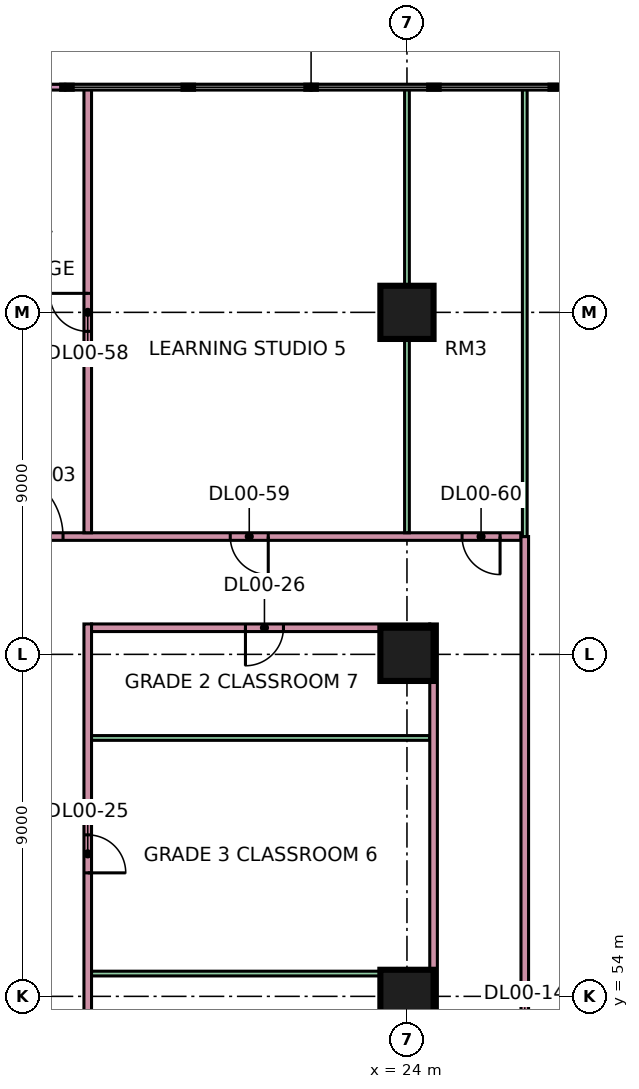
"""IFC4 building model, lengths in metres.
Left out: names, types, materials, properties, quantities, classifications, styles, units other than length and angle.
Written with IfcOpenShell. Run it as: python <this file> out.ifc"""

import sys

from ifc_helpers import new_model, si_unit, direction, frame, frame_2d, origin, origin_2d, place, context, subcontext, project, spatial, rectangle, extrude, element, fill, save


model = new_model("IFC4")
c1 = context("Model", 3, precision=1e-05, world=origin(), true_north=direction((0.0, 1.0)))
c2 = subcontext(c1, "Body", "Model", "MODEL_VIEW")
j1 = project(units=[si_unit("LENGTHUNIT", "METRE"), si_unit("PLANEANGLEUNIT", "RADIAN")], contexts=[c1])
p1 = place(None, origin())
s1 = spatial("IfcSite", under=j1, at=p1, CompositionType="ELEMENT")
p2 = place(p1, origin())
s2 = spatial("IfcBuilding", under=s1, at=p2, CompositionType="ELEMENT")
p3 = place(p2, origin())
s3 = spatial("IfcBuildingStorey", under=s2, at=p3, CompositionType="ELEMENT", Elevation=0.0)
for number, where, z_axis, x_axis in (
    (1, (24.0, 54.0, 0.0), (0.0, 0.0, 1.0), (1.0, 0.0, 0.0)),
    (2, (24.0, 63.0, 0.0), (0.0, 0.0, 1.0), (1.0, 0.0, 0.0)),
    (3, (24.0, 72.0, 0.0), (0.0, 0.0, 1.0), (1.0, 0.0, 0.0)),
):
    element("IfcColumn", number, at=place(p3, frame(where, z_axis=z_axis, x_axis=x_axis)), inside=s3, PredefinedType="COLUMN", context=c2, shape_type="SweptSolid", body=[
        extrude(rectangle(XDim=1.4, YDim=1.4, at=origin_2d()), origin(), (0.0, 0.0, 1.0), 7.2),
    ])
p4 = place(p3, frame((15.0, 77.925, 0.0), z_axis=(0.0, 0.0, 1.0), x_axis=(-1.0, 0.0, 0.0)))
e4 = element("IfcWall", 4, at=p4, inside=s3, PredefinedType="SOLIDWALL", context=c2, shape_type="SweptSolid", body=[
    extrude(rectangle(XDim=6.0, YDim=0.15, at=frame_2d((3.0, 0.0))), origin(), (0.0, 0.0, 1.0), 6.8),
])
p5 = place(p4, frame((1.2, 0.0, 0.0)))
e5 = element("IfcOpeningElement", 5, at=p5, cuts=e4, PredefinedType="OPENING", context=c2, shape_type="SweptSolid", body=[
    extrude(rectangle(XDim=3.6, YDim=2.8, at=frame_2d((1.8, 1.4))), frame((0.0, 0.085, 0.0), z_axis=(0.0, -1.0, 0.0), x_axis=(1.0, 0.0, 0.0)), (0.0, 0.0, 1.0), 0.17),
])
p6 = place(p3, frame((-3.0, 66.1, 0.0), z_axis=(0.0, 0.0, 1.0), x_axis=(1.0, 0.0, 0.0)))
e6 = element("IfcWall", 6, at=p6, inside=s3, PredefinedType="PARTITIONING", context=c2, shape_type="SweptSolid", body=[
    extrude(rectangle(XDim=30.0, YDim=0.2, at=frame_2d((15.0, 0.0))), origin(), (0.0, 0.0, 1.0), 6.8),
])
p7 = place(p6, frame((0.65, 0.0, 0.0)))
e7 = element("IfcOpeningElement", 7, at=p7, cuts=e6, PredefinedType="OPENING", context=c2, shape_type="SweptSolid", body=[
    extrude(rectangle(XDim=1.0, YDim=2.1, at=frame_2d((0.5, 1.05))), frame((0.0, 0.11, 0.0), z_axis=(0.0, -1.0, 0.0), x_axis=(1.0, 0.0, 0.0)), (0.0, 0.0, 1.0), 0.22),
])
p8 = place(p6, frame((8.6, 0.0, 0.0)))
e8 = element("IfcOpeningElement", 8, at=p8, cuts=e6, PredefinedType="OPENING", context=c2, shape_type="SweptSolid", body=[
    extrude(rectangle(XDim=1.0, YDim=2.1, at=frame_2d((0.5, 1.05))), frame((0.0, 0.11, 0.0), z_axis=(0.0, -1.0, 0.0), x_axis=(1.0, 0.0, 0.0)), (0.0, 0.0, 1.0), 0.22),
])
p9 = place(p6, frame((22.35, 0.0, 0.0)))
e9 = element("IfcOpeningElement", 9, at=p9, cuts=e6, PredefinedType="OPENING", context=c2, shape_type="SweptSolid", body=[
    extrude(rectangle(XDim=1.0, YDim=2.1, at=frame_2d((0.5, 1.05))), frame((0.0, 0.11, 0.0), z_axis=(0.0, -1.0, 0.0), x_axis=(1.0, 0.0, 0.0)), (0.0, 0.0, 1.0), 0.22),
])
p10 = place(p6, frame((28.45, 0.0, 0.0)))
e10 = element("IfcOpeningElement", 10, at=p10, cuts=e6, PredefinedType="OPENING", context=c2, shape_type="SweptSolid", body=[
    extrude(rectangle(XDim=1.0, YDim=2.1, at=frame_2d((0.5, 1.05))), frame((0.0, 0.11, 0.0), z_axis=(0.0, -1.0, 0.0), x_axis=(1.0, 0.0, 0.0)), (0.0, 0.0, 1.0), 0.22),
])
p11 = place(p6, frame((16.15, 0.0, 0.0)))
e11 = element("IfcOpeningElement", 11, at=p11, cuts=e6, PredefinedType="OPENING", context=c2, shape_type="SweptSolid", body=[
    extrude(rectangle(XDim=1.8, YDim=2.1, at=frame_2d((0.9, 1.05))), frame((0.0, 0.11, 0.0), z_axis=(0.0, -1.0, 0.0), x_axis=(1.0, 0.0, 0.0)), (0.0, 0.0, 1.0), 0.22),
])
p12 = place(p3, frame((15.6, 51.225, 0.0), z_axis=(0.0, 0.0, 1.0), x_axis=(0.0, 1.0, 0.0)))
e12 = element("IfcWall", 12, at=p12, inside=s3, PredefinedType="PARTITIONING", context=c2, shape_type="SweptSolid", body=[
    extrude(rectangle(XDim=12.575, YDim=0.2, at=frame_2d((6.288, 0.0))), origin(), (0.0, 0.0, 1.0), 6.8),
])
p13 = place(p12, frame((6.025, 0.0, 0.0)))
e13 = element("IfcOpeningElement", 13, at=p13, cuts=e12, PredefinedType="OPENING", context=c2, shape_type="SweptSolid", body=[
    extrude(rectangle(XDim=1.0, YDim=2.1, at=frame_2d((0.5, 1.05))), frame((0.0, 0.11, 0.0), z_axis=(0.0, -1.0, 0.0), x_axis=(1.0, 0.0, 0.0)), (0.0, 0.0, 1.0), 0.22),
])
p14 = place(p3, frame((15.6, 66.2, 0.0), z_axis=(0.0, 0.0, 1.0), x_axis=(0.0, 1.0, 0.0)))
e14 = element("IfcWall", 14, at=p14, inside=s3, PredefinedType="PARTITIONING", context=c2, shape_type="SweptSolid", body=[
    extrude(rectangle(XDim=11.725, YDim=0.2, at=frame_2d((5.863, 0.0))), origin(), (0.0, 0.0, 1.0), 6.8),
])
p15 = place(p14, frame((5.3, 0.0, 0.0)))
e15 = element("IfcOpeningElement", 15, at=p15, cuts=e14, PredefinedType="OPENING", context=c2, shape_type="SweptSolid", body=[
    extrude(rectangle(XDim=1.0, YDim=2.1, at=frame_2d((0.5, 1.05))), frame((0.0, 0.11, 0.0), z_axis=(0.0, -1.0, 0.0), x_axis=(1.0, 0.0, 0.0)), (0.0, 0.0, 1.0), 0.22),
])
for number, where, z_axis, x_axis in (
    (16, (15.7, 54.6, 0.0), (0.0, 0.0, 1.0), (1.0, 0.0, 0.0)),
    (17, (15.7, 60.8, 0.0), (0.0, 0.0, 1.0), (1.0, 0.0, 0.0)),
):
    element("IfcWall", number, at=place(p3, frame(where, z_axis=z_axis, x_axis=x_axis)), inside=s3, PredefinedType="PARTITIONING", context=c2, shape_type="SweptSolid", body=[
        extrude(rectangle(XDim=8.9, YDim=0.125, at=frame_2d((4.45, 0.0))), origin(), (0.0, 0.0, 1.0), 6.8),
    ])
p16 = place(p3, frame((15.7, 63.7, 0.0), z_axis=(0.0, 0.0, 1.0), x_axis=(1.0, 0.0, 0.0)))
e18 = element("IfcWall", 18, at=p16, inside=s3, PredefinedType="PARTITIONING", context=c2, shape_type="SweptSolid", body=[
    extrude(rectangle(XDim=8.9, YDim=0.2, at=frame_2d((4.45, 0.0))), origin(), (0.0, 0.0, 1.0), 6.8),
])
p17 = place(p16, frame((4.05, 0.0, 0.0)))
e19 = element("IfcOpeningElement", 19, at=p17, cuts=e18, PredefinedType="OPENING", context=c2, shape_type="SweptSolid", body=[
    extrude(rectangle(XDim=1.0, YDim=2.1, at=frame_2d((0.5, 1.05))), frame((0.0, 0.11, 0.0), z_axis=(0.0, -1.0, 0.0), x_axis=(1.0, 0.0, 0.0)), (0.0, 0.0, 1.0), 0.22),
])
p18 = place(p3, frame((24.0, 66.2, 0.0), z_axis=(0.0, 0.0, 1.0), x_axis=(0.0, 1.0, 0.0)))
e20 = element("IfcWall", 20, at=p18, inside=s3, PredefinedType="PARTITIONING", context=c2, shape_type="SweptSolid", body=[
    extrude(rectangle(XDim=11.725, YDim=0.125, at=frame_2d((5.863, 0.0))), origin(), (0.0, 0.0, 1.0), 6.8),
])
p19 = place(p3, frame((24.7, 44.3, 0.0), z_axis=(0.0, 0.0, 1.0), x_axis=(0.0, 1.0, 0.0)))
e21 = element("IfcWall", 21, at=p19, inside=s3, PredefinedType="PARTITIONING", context=c2, shape_type="SweptSolid", body=[
    extrude(rectangle(XDim=19.5, YDim=0.2, at=frame_2d((9.75, 0.0))), origin(), (0.0, 0.0, 1.0), 6.8),
])
p20 = place(p19, frame((1.45, 0.0, 0.0)))
e22 = element("IfcOpeningElement", 22, at=p20, cuts=e21, PredefinedType="OPENING", context=c2, shape_type="SweptSolid", body=[
    extrude(rectangle(XDim=1.0, YDim=2.1, at=frame_2d((0.5, 1.05))), frame((0.0, 0.11, 0.0), z_axis=(0.0, -1.0, 0.0), x_axis=(1.0, 0.0, 0.0)), (0.0, 0.0, 1.0), 0.22),
])
p21 = place(p19, frame((6.65, 0.0, 0.0)))
e23 = element("IfcOpeningElement", 23, at=p21, cuts=e21, PredefinedType="OPENING", context=c2, shape_type="SweptSolid", body=[
    extrude(rectangle(XDim=1.0, YDim=2.1, at=frame_2d((0.5, 1.05))), frame((0.0, 0.11, 0.0), z_axis=(0.0, -1.0, 0.0), x_axis=(1.0, 0.0, 0.0)), (0.0, 0.0, 1.0), 0.22),
])
p22 = place(p3, frame((27.1, 38.5, 0.0), z_axis=(0.0, 0.0, 1.0), x_axis=(0.0, 1.0, 0.0)))
e24 = element("IfcWall", 24, at=p22, inside=s3, PredefinedType="PARTITIONING", context=c2, shape_type="SweptSolid", body=[
    extrude(rectangle(XDim=27.6, YDim=0.2, at=frame_2d((13.8, 0.0))), origin(), (0.0, 0.0, 1.0), 6.8),
])
p23 = place(p22, frame((13.05, 0.0, 0.0)))
e25 = element("IfcOpeningElement", 25, at=p23, cuts=e24, PredefinedType="OPENING", context=c2, shape_type="SweptSolid", body=[
    extrude(rectangle(XDim=1.8, YDim=2.1, at=frame_2d((0.9, 1.05))), frame((0.0, 0.11, 0.0), z_axis=(0.0, -1.0, 0.0), x_axis=(1.0, 0.0, 0.0)), (0.0, 0.0, 1.0), 0.22),
])
p24 = place(p22, frame((3.05, 0.0, 0.0)))
e26 = element("IfcOpeningElement", 26, at=p24, cuts=e24, PredefinedType="OPENING", context=c2, shape_type="SweptSolid", body=[
    extrude(rectangle(XDim=1.8, YDim=2.1, at=frame_2d((0.9, 1.05))), frame((0.0, 0.11, 0.0), z_axis=(0.0, -1.0, 0.0), x_axis=(1.0, 0.0, 0.0)), (0.0, 0.0, 1.0), 0.22),
])
p25 = place(p3, frame((27.1, 66.1, 0.0), z_axis=(0.0, 0.0, 1.0), x_axis=(0.0, 1.0, 0.0)))
e27 = element("IfcWall", 27, at=p25, inside=s3, PredefinedType="PARTITIONING", context=c2, shape_type="SweptSolid", body=[
    extrude(rectangle(XDim=11.825, YDim=0.125, at=frame_2d((5.913, 0.0))), origin(), (0.0, 0.0, 1.0), 6.8),
])
p26 = place(p13, frame((1.0, 0.0, 0.0), z_axis=(0.0, 0.0, 1.0), x_axis=(-1.0, 0.0, 0.0)))
e28 = element("IfcDoor", 28, at=p26, inside=s3, OperationType="SINGLE_SWING_LEFT", PredefinedType="DOOR", context=c2, shape_type="SweptSolid", body=[
    extrude(rectangle(XDim=1.0, YDim=2.1, at=frame_2d((0.5, 1.05))), frame((0.0, 0.025, 0.0), z_axis=(0.0, -1.0, 0.0), x_axis=(1.0, 0.0, 0.0)), (0.0, 0.0, 1.0), 0.05),
])
fill(e13, e28)
p27 = place(p17, frame((1.0, 0.0, 0.0), z_axis=(0.0, 0.0, 1.0), x_axis=(-1.0, 0.0, 0.0)))
e29 = element("IfcDoor", 29, at=p27, inside=s3, OperationType="SINGLE_SWING_LEFT", PredefinedType="DOOR", context=c2, shape_type="SweptSolid", body=[
    extrude(rectangle(XDim=1.0, YDim=2.1, at=frame_2d((0.5, 1.05))), frame((0.0, 0.025, 0.0), z_axis=(0.0, -1.0, 0.0), x_axis=(1.0, 0.0, 0.0)), (0.0, 0.0, 1.0), 0.05),
])
fill(e19, e29)
p28 = place(p15, frame((1.0, 0.0, 0.0), z_axis=(0.0, 0.0, 1.0), x_axis=(-1.0, 0.0, 0.0)))
e30 = element("IfcDoor", 30, at=p28, inside=s3, OperationType="SINGLE_SWING_RIGHT", PredefinedType="DOOR", context=c2, shape_type="SweptSolid", body=[
    extrude(rectangle(XDim=1.0, YDim=2.1, at=frame_2d((0.5, 1.05))), frame((0.0, 0.025, 0.0), z_axis=(0.0, -1.0, 0.0), x_axis=(1.0, 0.0, 0.0)), (0.0, 0.0, 1.0), 0.05),
])
fill(e15, e30)
p29 = place(p9, origin())
e31 = element("IfcDoor", 31, at=p29, inside=s3, OperationType="SINGLE_SWING_RIGHT", PredefinedType="DOOR", context=c2, shape_type="SweptSolid", body=[
    extrude(rectangle(XDim=1.0, YDim=2.1, at=frame_2d((0.5, 1.05))), frame((0.0, 0.025, 0.0), z_axis=(0.0, -1.0, 0.0), x_axis=(1.0, 0.0, 0.0)), (0.0, 0.0, 1.0), 0.05),
])
fill(e9, e31)
p30 = place(p10, origin())
e32 = element("IfcDoor", 32, at=p30, inside=s3, OperationType="SINGLE_SWING_RIGHT", PredefinedType="DOOR", context=c2, shape_type="SweptSolid", body=[
    extrude(rectangle(XDim=1.0, YDim=2.1, at=frame_2d((0.5, 1.05))), frame((0.0, 0.025, 0.0), z_axis=(0.0, -1.0, 0.0), x_axis=(1.0, 0.0, 0.0)), (0.0, 0.0, 1.0), 0.05),
])
fill(e10, e32)
p31 = place(p11, origin())
e33 = element("IfcDoor", 33, at=p31, inside=s3, OperationType="DOUBLE_DOOR_SINGLE_SWING", PredefinedType="DOOR", context=c2, shape_type="SweptSolid", body=[
    extrude(rectangle(XDim=1.8, YDim=2.1, at=frame_2d((0.9, 1.05))), frame((0.0, 0.025, 0.0), z_axis=(0.0, -1.0, 0.0), x_axis=(1.0, 0.0, 0.0)), (0.0, 0.0, 1.0), 0.05),
])
fill(e11, e33)
save(model, sys.argv[1])
